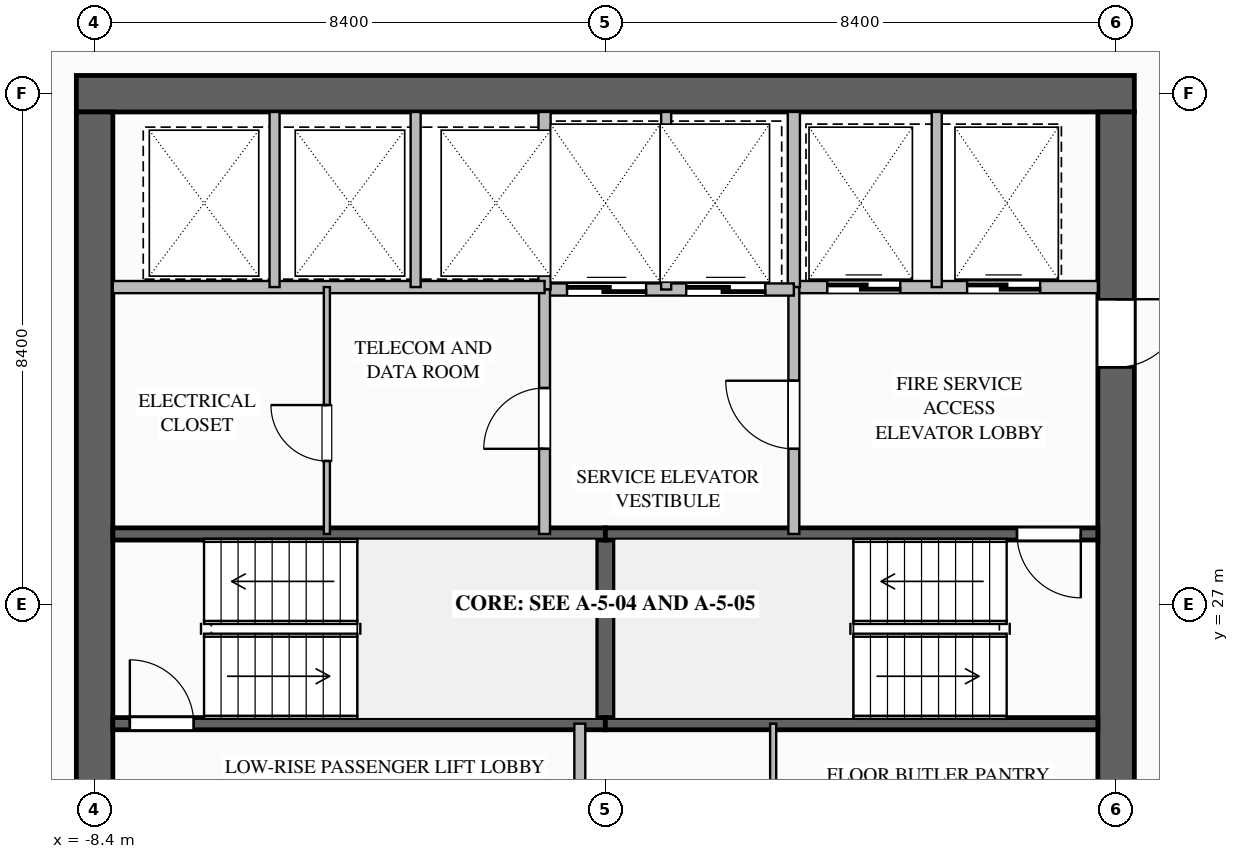
"""IFC4 building model, lengths in metres.
Left out: names, types, materials, properties, quantities, classifications, styles, units other than length and angle.
Written with IfcOpenShell. Run it as: python <this file> out.ifc"""

import sys

from ifc_helpers import new_model, si_unit, direction, frame, frame_2d, origin, place, context, subcontext, project, spatial, rectangle, extrude, element, fill, save


model = new_model("IFC4")
c1 = context("Model", 3, precision=1e-05, world=origin(), true_north=direction((0.0, 1.0)))
c2 = subcontext(c1, "Body", "Model", "MODEL_VIEW")
j1 = project(units=[si_unit("LENGTHUNIT", "METRE"), si_unit("PLANEANGLEUNIT", "RADIAN")], contexts=[c1])
p1 = place(None, origin())
s1 = spatial("IfcSite", under=j1, at=p1, CompositionType="ELEMENT")
p2 = place(p1, origin())
s2 = spatial("IfcBuilding", under=s1, at=p2, CompositionType="ELEMENT")
p3 = place(p2, frame((0.0, 0.0, 54.2)))
s3 = spatial("IfcBuildingStorey", under=s2, at=p3, CompositionType="ELEMENT", Elevation=54.2)
p4 = place(p3, frame((-8.7, 35.4, 0.0), z_axis=(0.0, 0.0, 1.0), x_axis=(1.0, 0.0, 0.0)))
e1 = element("IfcWall", 1, at=p4, inside=s3, PredefinedType="SHEAR", context=c2, shape_type="SweptSolid", body=[
    extrude(rectangle(XDim=17.4, YDim=0.6, at=frame_2d((8.7, 0.0))), origin(), (0.0, 0.0, 1.0), 3.5),
])
p5 = place(p3, frame((8.4, 35.1, 0.0), z_axis=(0.0, 0.0, 1.0), x_axis=(0.0, -1.0, 0.0)))
e2 = element("IfcWall", 2, at=p5, inside=s3, PredefinedType="SHEAR", context=c2, shape_type="SweptSolid", body=[
    extrude(rectangle(XDim=16.2, YDim=0.6, at=frame_2d((8.1, 0.0))), origin(), (0.0, 0.0, 1.0), 3.5),
])
p6 = place(p5, frame((3.08, 0.0, 0.0)))
e3 = element("IfcOpeningElement", 3, at=p6, cuts=e2, PredefinedType="OPENING", context=c2, shape_type="SweptSolid", body=[
    extrude(rectangle(XDim=1.12, YDim=2.1, at=frame_2d((0.56, 1.05))), frame((0.0, 0.31, 0.0), z_axis=(0.0, -1.0, 0.0), x_axis=(1.0, 0.0, 0.0)), (0.0, 0.0, 1.0), 0.62),
])
p7 = place(p3, frame((-8.4, 18.9, 0.0), z_axis=(0.0, 0.0, 1.0), x_axis=(0.0, 1.0, 0.0)))
e4 = element("IfcWall", 4, at=p7, inside=s3, PredefinedType="SHEAR", context=c2, shape_type="SweptSolid", body=[
    extrude(rectangle(XDim=16.2, YDim=0.6, at=frame_2d((8.1, 0.0))), origin(), (0.0, 0.0, 1.0), 3.5),
])
p8 = place(p7, frame((3.9, 0.0, 0.0)))
e5 = element("IfcOpeningElement", 5, at=p8, cuts=e4, PredefinedType="OPENING", context=c2, shape_type="SweptSolid", body=[
    extrude(rectangle(XDim=1.08, YDim=2.04, at=frame_2d((0.54, 1.02))), frame((0.0, 0.31, 0.0), z_axis=(0.0, -1.0, 0.0), x_axis=(1.0, 0.0, 0.0)), (0.0, 0.0, 1.0), 0.62),
])
p9 = place(p3, frame((0.0, 25.04, 0.0), z_axis=(0.0, 0.0, 1.0), x_axis=(0.0, 1.0, 0.0)))
e6 = element("IfcWall", 6, at=p9, inside=s3, PredefinedType="SOLIDWALL", context=c2, shape_type="SweptSolid", body=[
    extrude(rectangle(XDim=3.12, YDim=0.3, at=frame_2d((1.56, 0.0))), origin(), (0.0, 0.0, 1.0), 3.24),
])
p10 = place(p3, frame((-8.1, 25.04, 0.0), z_axis=(0.0, 0.0, 1.0), x_axis=(1.0, 0.0, 0.0)))
e7 = element("IfcWall", 7, at=p10, inside=s3, PredefinedType="SOLIDWALL", context=c2, shape_type="SweptSolid", body=[
    extrude(rectangle(XDim=8.1, YDim=0.2, at=frame_2d((4.05, 0.0))), origin(), (0.0, 0.0, 1.0), 3.24),
])
p11 = place(p10, frame((0.28, 0.0, 0.0)))
e8 = element("IfcOpeningElement", 8, at=p11, cuts=e7, PredefinedType="OPENING", context=c2, shape_type="SweptSolid", body=[
    extrude(rectangle(XDim=1.05, YDim=2.1, at=frame_2d((0.525, 1.05))), frame((0.0, 0.11, 0.0), z_axis=(0.0, -1.0, 0.0), x_axis=(1.0, 0.0, 0.0)), (0.0, 0.0, 1.0), 0.22),
])
for number, where, z_axis, x_axis in (
    (9, (-8.1, 28.16, 0.0), (0.0, 0.0, 1.0), (1.0, 0.0, 0.0)),
    (10, (0.0, 25.04, 0.0), (0.0, 0.0, 1.0), (1.0, 0.0, 0.0)),
):
    element("IfcWall", number, at=place(p3, frame(where, z_axis=z_axis, x_axis=x_axis)), inside=s3, PredefinedType="SOLIDWALL", context=c2, shape_type="SweptSolid", body=[
        extrude(rectangle(XDim=8.1, YDim=0.2, at=frame_2d((4.05, 0.0))), origin(), (0.0, 0.0, 1.0), 3.24),
    ])
p12 = place(p3, frame((8.1, 28.16, 0.0), z_axis=(0.0, 0.0, 1.0), x_axis=(-1.0, 0.0, 0.0)))
e11 = element("IfcWall", 11, at=p12, inside=s3, PredefinedType="SOLIDWALL", context=c2, shape_type="SweptSolid", body=[
    extrude(rectangle(XDim=8.1, YDim=0.2, at=frame_2d((4.05, 0.0))), origin(), (0.0, 0.0, 1.0), 3.24),
])
p13 = place(p12, frame((0.28, 0.0, 0.0)))
e12 = element("IfcOpeningElement", 12, at=p13, cuts=e11, PredefinedType="OPENING", context=c2, shape_type="SweptSolid", body=[
    extrude(rectangle(XDim=1.05, YDim=2.1, at=frame_2d((0.525, 1.05))), frame((0.0, 0.11, 0.0), z_axis=(0.0, -1.0, 0.0), x_axis=(1.0, 0.0, 0.0)), (0.0, 0.0, 1.0), 0.22),
])
p14 = place(p3, frame((3.1, 32.22, 0.0), z_axis=(0.0, 0.0, 1.0), x_axis=(1.0, 0.0, 0.0)))
e13 = element("IfcWall", 13, at=p14, inside=s3, PredefinedType="SOLIDWALL", context=c2, shape_type="SweptSolid", body=[
    extrude(rectangle(XDim=5.0, YDim=0.2, at=frame_2d((2.5, 0.0))), origin(), (0.0, 0.0, 1.0), 3.24),
])
p15 = place(p14, frame((0.55, 0.0, 0.0)))
e14 = element("IfcOpeningElement", 14, at=p15, cuts=e13, PredefinedType="OPENING", context=c2, shape_type="SweptSolid", body=[
    extrude(rectangle(XDim=1.2, YDim=2.2, at=frame_2d((0.6, 1.1))), frame((0.0, 0.11, 0.0), z_axis=(0.0, -1.0, 0.0), x_axis=(1.0, 0.0, 0.0)), (0.0, 0.0, 1.0), 0.22),
])
p16 = place(p14, frame((2.85, 0.0, 0.0)))
e15 = element("IfcOpeningElement", 15, at=p16, cuts=e13, PredefinedType="OPENING", context=c2, shape_type="SweptSolid", body=[
    extrude(rectangle(XDim=1.2, YDim=2.2, at=frame_2d((0.6, 1.1))), frame((0.0, 0.11, 0.0), z_axis=(0.0, -1.0, 0.0), x_axis=(1.0, 0.0, 0.0)), (0.0, 0.0, 1.0), 0.22),
])
p17 = place(p3, frame((3.1, 32.22, 0.0), z_axis=(0.0, 0.0, 1.0), x_axis=(0.0, 1.0, 0.0)))
e16 = element("IfcWall", 16, at=p17, inside=s3, PredefinedType="SOLIDWALL", context=c2, shape_type="SweptSolid", body=[
    extrude(rectangle(XDim=2.88, YDim=0.2, at=frame_2d((1.44, 0.0))), origin(), (0.0, 0.0, 1.0), 3.24),
])
p18 = place(p3, frame((5.45, 32.22, 0.0), z_axis=(0.0, 0.0, 1.0), x_axis=(0.0, 1.0, 0.0)))
e17 = element("IfcWall", 17, at=p18, inside=s3, PredefinedType="PARTITIONING", context=c2, shape_type="SweptSolid", body=[
    extrude(rectangle(XDim=2.88, YDim=0.165, at=frame_2d((1.44, 0.0))), origin(), (0.0, 0.0, 1.0), 3.24),
])
p19 = place(p3, frame((3.1, 28.16, 0.0), z_axis=(0.0, 0.0, 1.0), x_axis=(0.0, 1.0, 0.0)))
e18 = element("IfcWall", 18, at=p19, inside=s3, PredefinedType="SOLIDWALL", context=c2, shape_type="SweptSolid", body=[
    extrude(rectangle(XDim=4.06, YDim=0.18, at=frame_2d((2.03, 0.0))), origin(), (0.0, 0.0, 1.0), 3.24),
])
p20 = place(p19, frame((1.4, 0.0, 0.0)))
e19 = element("IfcOpeningElement", 19, at=p20, cuts=e18, PredefinedType="OPENING", context=c2, shape_type="SweptSolid", body=[
    extrude(rectangle(XDim=1.12, YDim=2.1, at=frame_2d((0.56, 1.05))), frame((0.0, 0.1, 0.0), z_axis=(0.0, -1.0, 0.0), x_axis=(1.0, 0.0, 0.0)), (0.0, 0.0, 1.0), 0.2),
])
p21 = place(p3, frame((-1.0, 32.18, 0.0), z_axis=(0.0, 0.0, 1.0), x_axis=(1.0, 0.0, 0.0)))
e20 = element("IfcWall", 20, at=p21, inside=s3, PredefinedType="SOLIDWALL", context=c2, shape_type="SweptSolid", body=[
    extrude(rectangle(XDim=4.1, YDim=0.2, at=frame_2d((2.05, 0.0))), origin(), (0.0, 0.0, 1.0), 3.24),
])
p22 = place(p21, frame((0.37, 0.0, 0.0)))
e21 = element("IfcOpeningElement", 21, at=p22, cuts=e20, PredefinedType="OPENING", context=c2, shape_type="SweptSolid", body=[
    extrude(rectangle(XDim=1.3, YDim=2.2, at=frame_2d((0.65, 1.1))), frame((0.0, 0.11, 0.0), z_axis=(0.0, -1.0, 0.0), x_axis=(1.0, 0.0, 0.0)), (0.0, 0.0, 1.0), 0.22),
])
p23 = place(p21, frame((2.33, 0.0, 0.0)))
e22 = element("IfcOpeningElement", 22, at=p23, cuts=e20, PredefinedType="OPENING", context=c2, shape_type="SweptSolid", body=[
    extrude(rectangle(XDim=1.3, YDim=2.2, at=frame_2d((0.65, 1.1))), frame((0.0, 0.11, 0.0), z_axis=(0.0, -1.0, 0.0), x_axis=(1.0, 0.0, 0.0)), (0.0, 0.0, 1.0), 0.22),
])
p24 = place(p3, frame((-1.0, 32.18, 0.0), z_axis=(0.0, 0.0, 1.0), x_axis=(0.0, 1.0, 0.0)))
e23 = element("IfcWall", 23, at=p24, inside=s3, PredefinedType="SOLIDWALL", context=c2, shape_type="SweptSolid", body=[
    extrude(rectangle(XDim=2.92, YDim=0.2, at=frame_2d((1.46, 0.0))), origin(), (0.0, 0.0, 1.0), 3.24),
])
p25 = place(p3, frame((1.0, 32.18, 0.0), z_axis=(0.0, 0.0, 1.0), x_axis=(0.0, 1.0, 0.0)))
e24 = element("IfcWall", 24, at=p25, inside=s3, PredefinedType="PARTITIONING", context=c2, shape_type="SweptSolid", body=[
    extrude(rectangle(XDim=2.92, YDim=0.165, at=frame_2d((1.46, 0.0))), origin(), (0.0, 0.0, 1.0), 3.24),
])
p26 = place(p3, frame((-1.0, 28.16, 0.0), z_axis=(0.0, 0.0, 1.0), x_axis=(0.0, 1.0, 0.0)))
e25 = element("IfcWall", 25, at=p26, inside=s3, PredefinedType="SOLIDWALL", context=c2, shape_type="SweptSolid", body=[
    extrude(rectangle(XDim=4.02, YDim=0.18, at=frame_2d((2.01, 0.0))), origin(), (0.0, 0.0, 1.0), 3.24),
])
p27 = place(p26, frame((1.4, 0.0, 0.0)))
e26 = element("IfcOpeningElement", 26, at=p27, cuts=e25, PredefinedType="OPENING", context=c2, shape_type="SweptSolid", body=[
    extrude(rectangle(XDim=1.0, YDim=2.1, at=frame_2d((0.5, 1.05))), frame((0.0, 0.1, 0.0), z_axis=(0.0, -1.0, 0.0), x_axis=(1.0, 0.0, 0.0)), (0.0, 0.0, 1.0), 0.2),
])
p28 = place(p3, frame((-8.1, 32.22, 0.0), z_axis=(0.0, 0.0, 1.0), x_axis=(1.0, 0.0, 0.0)))
e27 = element("IfcWall", 27, at=p28, inside=s3, PredefinedType="SOLIDWALL", context=c2, shape_type="SweptSolid", body=[
    extrude(rectangle(XDim=7.1, YDim=0.2, at=frame_2d((3.55, 0.0))), origin(), (0.0, 0.0, 1.0), 3.24),
])
for number, where, z_axis, x_axis in (
    (28, (-5.44, 32.22, 0.0), (0.0, 0.0, 1.0), (0.0, 1.0, 0.0)),
    (29, (-3.12, 32.22, 0.0), (0.0, 0.0, 1.0), (0.0, 1.0, 0.0)),
):
    element("IfcWall", number, at=place(p3, frame(where, z_axis=z_axis, x_axis=x_axis)), inside=s3, PredefinedType="PARTITIONING", context=c2, shape_type="SweptSolid", body=[
        extrude(rectangle(XDim=2.88, YDim=0.165, at=frame_2d((1.44, 0.0))), origin(), (0.0, 0.0, 1.0), 3.24),
    ])
p29 = place(p3, frame((-4.58, 28.16, 0.0), z_axis=(0.0, 0.0, 1.0), x_axis=(0.0, 1.0, 0.0)))
e30 = element("IfcWall", 30, at=p29, inside=s3, PredefinedType="PARTITIONING", context=c2, shape_type="SweptSolid", body=[
    extrude(rectangle(XDim=4.06, YDim=0.1, at=frame_2d((2.03, 0.0))), origin(), (0.0, 0.0, 1.0), 3.24),
])
p30 = place(p29, frame((1.2, 0.0, 0.0)))
e31 = element("IfcOpeningElement", 31, at=p30, cuts=e30, PredefinedType="OPENING", context=c2, shape_type="SweptSolid", body=[
    extrude(rectangle(XDim=0.92, YDim=2.1, at=frame_2d((0.46, 1.05))), frame((0.0, 0.06, 0.0), z_axis=(0.0, -1.0, 0.0), x_axis=(1.0, 0.0, 0.0)), (0.0, 0.0, 1.0), 0.12),
])
p31 = place(p3, frame((-0.42, 21.78, 0.0), z_axis=(0.0, 0.0, 1.0), x_axis=(0.0, 1.0, 0.0)))
e32 = element("IfcWall", 32, at=p31, inside=s3, PredefinedType="SOLIDWALL", context=c2, shape_type="SweptSolid", body=[
    extrude(rectangle(XDim=3.26, YDim=0.18, at=frame_2d((1.63, 0.0))), origin(), (0.0, 0.0, 1.0), 3.24),
])
p32 = place(p31, frame((1.1, 0.0, 0.0)))
e33 = element("IfcOpeningElement", 33, at=p32, cuts=e32, PredefinedType="OPENING", context=c2, shape_type="SweptSolid", body=[
    extrude(rectangle(XDim=1.0, YDim=2.1, at=frame_2d((0.5, 1.05))), frame((0.0, 0.1, 0.0), z_axis=(0.0, -1.0, 0.0), x_axis=(1.0, 0.0, 0.0)), (0.0, 0.0, 1.0), 0.2),
])
p33 = place(p3, frame((2.76, 21.78, 0.0), z_axis=(0.0, 0.0, 1.0), x_axis=(0.0, 1.0, 0.0)))
e34 = element("IfcWall", 34, at=p33, inside=s3, PredefinedType="PARTITIONING", context=c2, shape_type="SweptSolid", body=[
    extrude(rectangle(XDim=3.26, YDim=0.1, at=frame_2d((1.63, 0.0))), origin(), (0.0, 0.0, 1.0), 3.24),
])
p34 = place(p33, frame((1.0, 0.0, 0.0)))
e35 = element("IfcOpeningElement", 35, at=p34, cuts=e34, PredefinedType="OPENING", context=c2, shape_type="SweptSolid", body=[
    extrude(rectangle(XDim=0.92, YDim=2.1, at=frame_2d((0.46, 1.05))), frame((0.0, 0.06, 0.0), z_axis=(0.0, -1.0, 0.0), x_axis=(1.0, 0.0, 0.0)), (0.0, 0.0, 1.0), 0.12),
])
p35 = place(p11, origin())
e36 = element("IfcDoor", 36, at=p35, inside=s3, OperationType="SINGLE_SWING_LEFT", PredefinedType="DOOR", context=c2, shape_type="SweptSolid", body=[
    extrude(rectangle(XDim=1.05, YDim=2.1, at=frame_2d((0.525, 1.05))), frame((0.0, 0.025, 0.0), z_axis=(0.0, -1.0, 0.0), x_axis=(1.0, 0.0, 0.0)), (0.0, 0.0, 1.0), 0.05),
])
fill(e8, e36)
p36 = place(p13, origin())
e37 = element("IfcDoor", 37, at=p36, inside=s3, OperationType="SINGLE_SWING_LEFT", PredefinedType="DOOR", context=c2, shape_type="SweptSolid", body=[
    extrude(rectangle(XDim=1.05, YDim=2.1, at=frame_2d((0.525, 1.05))), frame((0.0, 0.025, 0.0), z_axis=(0.0, -1.0, 0.0), x_axis=(1.0, 0.0, 0.0)), (0.0, 0.0, 1.0), 0.05),
])
fill(e12, e37)
p37 = place(p15, origin())
e38 = element("IfcDoor", 38, at=p37, inside=s3, OperationType="SLIDING_TO_LEFT", PredefinedType="DOOR", context=c2, shape_type="SweptSolid", body=[
    extrude(rectangle(XDim=1.2, YDim=2.2, at=frame_2d((0.6, 1.1))), frame((0.0, 0.025, 0.0), z_axis=(0.0, -1.0, 0.0), x_axis=(1.0, 0.0, 0.0)), (0.0, 0.0, 1.0), 0.05),
])
fill(e14, e38)
p38 = place(p16, origin())
e39 = element("IfcDoor", 39, at=p38, inside=s3, OperationType="SLIDING_TO_LEFT", PredefinedType="DOOR", context=c2, shape_type="SweptSolid", body=[
    extrude(rectangle(XDim=1.2, YDim=2.2, at=frame_2d((0.6, 1.1))), frame((0.0, 0.025, 0.0), z_axis=(0.0, -1.0, 0.0), x_axis=(1.0, 0.0, 0.0)), (0.0, 0.0, 1.0), 0.05),
])
fill(e15, e39)
p39 = place(p20, origin())
e40 = element("IfcDoor", 40, at=p39, inside=s3, OperationType="SINGLE_SWING_RIGHT", PredefinedType="DOOR", context=c2, shape_type="SweptSolid", body=[
    extrude(rectangle(XDim=1.12, YDim=2.1, at=frame_2d((0.56, 1.05))), frame((0.0, 0.025, 0.0), z_axis=(0.0, -1.0, 0.0), x_axis=(1.0, 0.0, 0.0)), (0.0, 0.0, 1.0), 0.05),
])
fill(e19, e40)
p40 = place(p6, origin())
e41 = element("IfcDoor", 41, at=p40, inside=s3, OperationType="SINGLE_SWING_LEFT", PredefinedType="DOOR", context=c2, shape_type="SweptSolid", body=[
    extrude(rectangle(XDim=1.12, YDim=2.1, at=frame_2d((0.56, 1.05))), frame((0.0, 0.025, 0.0), z_axis=(0.0, -1.0, 0.0), x_axis=(1.0, 0.0, 0.0)), (0.0, 0.0, 1.0), 0.05),
])
fill(e3, e41)
p41 = place(p22, origin())
e42 = element("IfcDoor", 42, at=p41, inside=s3, OperationType="SLIDING_TO_LEFT", PredefinedType="DOOR", context=c2, shape_type="SweptSolid", body=[
    extrude(rectangle(XDim=1.3, YDim=2.2, at=frame_2d((0.65, 1.1))), frame((0.0, 0.025, 0.0), z_axis=(0.0, -1.0, 0.0), x_axis=(1.0, 0.0, 0.0)), (0.0, 0.0, 1.0), 0.05),
])
fill(e21, e42)
p42 = place(p23, origin())
e43 = element("IfcDoor", 43, at=p42, inside=s3, OperationType="SLIDING_TO_LEFT", PredefinedType="DOOR", context=c2, shape_type="SweptSolid", body=[
    extrude(rectangle(XDim=1.3, YDim=2.2, at=frame_2d((0.65, 1.1))), frame((0.0, 0.025, 0.0), z_axis=(0.0, -1.0, 0.0), x_axis=(1.0, 0.0, 0.0)), (0.0, 0.0, 1.0), 0.05),
])
fill(e22, e43)
p43 = place(p27, origin())
e44 = element("IfcDoor", 44, at=p43, inside=s3, OperationType="SINGLE_SWING_LEFT", PredefinedType="DOOR", context=c2, shape_type="SweptSolid", body=[
    extrude(rectangle(XDim=1.0, YDim=2.1, at=frame_2d((0.5, 1.05))), frame((0.0, 0.025, 0.0), z_axis=(0.0, -1.0, 0.0), x_axis=(1.0, 0.0, 0.0)), (0.0, 0.0, 1.0), 0.05),
])
fill(e26, e44)
p44 = place(p30, origin())
e45 = element("IfcDoor", 45, at=p44, inside=s3, OperationType="SINGLE_SWING_RIGHT", PredefinedType="DOOR", context=c2, shape_type="SweptSolid", body=[
    extrude(rectangle(XDim=0.92, YDim=2.1, at=frame_2d((0.46, 1.05))), frame((0.0, 0.025, 0.0), z_axis=(0.0, -1.0, 0.0), x_axis=(1.0, 0.0, 0.0)), (0.0, 0.0, 1.0), 0.05),
])
fill(e31, e45)
save(model, sys.argv[1])
